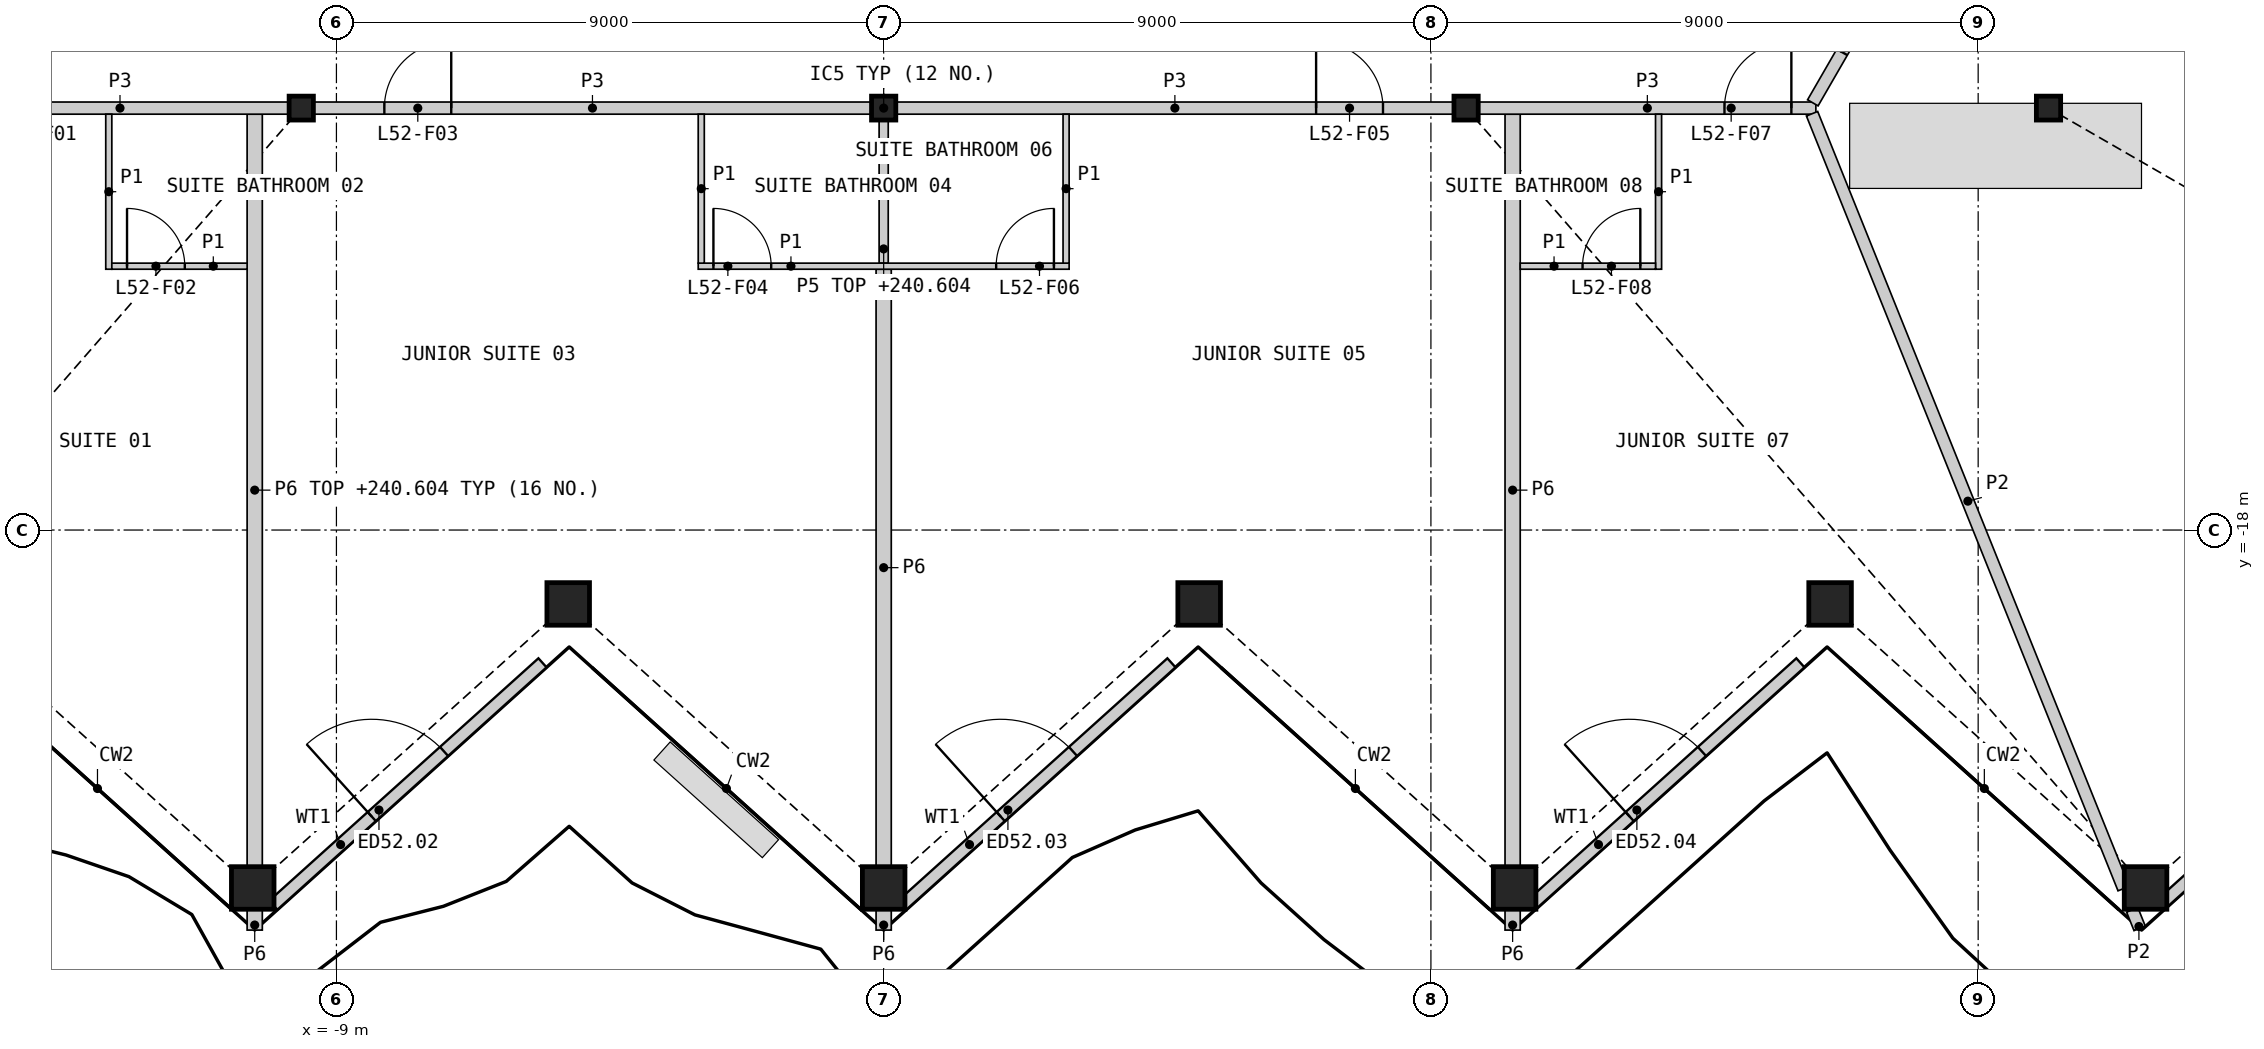
"""IFC4 building model, lengths in metres.
Left out: names, types, materials, properties, quantities, classifications, styles, units other than length and angle.
Written with IfcOpenShell. Run it as: python <this file> out.ifc"""

import sys

from ifc_helpers import new_model, si_unit, direction, frame, frame_2d, origin, origin_2d, place, context, subcontext, project, spatial, rectangle, hollow_rectangle, i_section, extrude, element, fill, save


model = new_model("IFC4")
c1 = context("Model", 3, precision=1e-05, world=origin(), true_north=direction((0.0, 1.0)))
c2 = subcontext(c1, "Body", "Model", "MODEL_VIEW")
j1 = project(units=[si_unit("LENGTHUNIT", "METRE"), si_unit("PLANEANGLEUNIT", "RADIAN")], contexts=[c1])
p1 = place(None, origin())
s1 = spatial("IfcSite", under=j1, at=p1, CompositionType="ELEMENT")
p2 = place(p1, origin())
s2 = spatial("IfcBuilding", under=s1, at=p2, CompositionType="ELEMENT")
p3 = place(p2, frame((0.0, 0.0, 238.2)))
s3 = spatial("IfcBuildingStorey", under=s2, at=p3, CompositionType="ELEMENT", Elevation=238.2)
for number, where, z_axis, x_axis in (
    (1, (-10.376, -23.887, 0.0), (0.0, 0.0, 1.0), (1.0, 0.0, 0.0)),
    (2, (-5.188, -19.215, 0.0), (0.0, 0.0, 1.0), (1.0, 0.0, 0.0)),
    (3, (0.0, -23.887, 0.0), (0.0, 0.0, 1.0), (1.0, 0.0, 0.0)),
    (4, (5.188, -19.215, 0.0), (0.0, 0.0, 1.0), (1.0, 0.0, 0.0)),
    (5, (10.376, -23.887, 0.0), (0.0, 0.0, 1.0), (1.0, 0.0, 0.0)),
    (6, (15.565, -19.215, 0.0), (0.0, 0.0, 1.0), (1.0, 0.0, 0.0)),
    (7, (20.753, -23.887, 0.0), (0.0, 0.0, 1.0), (1.0, 0.0, 0.0)),
):
    element("IfcColumn", number, at=place(p3, frame(where, z_axis=z_axis, x_axis=x_axis)), inside=s3, PredefinedType="COLUMN", context=c2, shape_type="SweptSolid", body=[
        extrude(hollow_rectangle(XDim=0.7, YDim=0.7, WallThickness=0.045, at=origin_2d()), origin(), (0.0, 0.0, 1.0), 3.6),
    ])
for number, where, z_axis, x_axis in (
    (8, (-9.578, -11.06, 0.0), (0.0, 0.0, 1.0), (1.0, 0.0, 0.0)),
    (9, (0.0, -11.06, 0.0), (0.0, 0.0, 1.0), (1.0, 0.0, 0.0)),
    (10, (9.578, -11.06, 0.0), (0.0, 0.0, 1.0), (1.0, 0.0, 0.0)),
    (11, (19.157, -11.06, 0.0), (0.0, 0.0, 1.0), (1.0, 0.0, 0.0)),
):
    element("IfcColumn", number, at=place(p3, frame(where, z_axis=z_axis, x_axis=x_axis)), inside=s3, PredefinedType="COLUMN", context=c2, shape_type="SweptSolid", body=[
        extrude(i_section(OverallWidth=0.399, OverallDepth=0.393, WebThickness=0.023, FlangeThickness=0.037, at=origin_2d()), origin(), (0.0, 0.0, 1.0), 3.6),
    ])
p4 = place(p3, frame((-10.038, -24.17, 0.0), z_axis=(0.0, 0.0, 1.0), x_axis=(0.743143336638, 0.669132259878, 0.0)))
e12 = element("IfcWall", 12, at=p4, inside=s3, PredefinedType="SOLIDWALL", context=c2, shape_type="SweptSolid", body=[
    extrude(rectangle(XDim=5.958, YDim=0.2, at=frame_2d((2.979, 0.0))), origin(), (0.0, 0.0, 1.0), 2.701),
])
p5 = place(p4, frame((2.179, 0.0, 0.0)))
e13 = element("IfcOpeningElement", 13, at=p5, cuts=e12, PredefinedType="OPENING", context=c2, shape_type="SweptSolid", body=[
    extrude(rectangle(XDim=1.6, YDim=2.4, at=frame_2d((0.8, 1.2))), frame((0.0, 0.11, 0.0), z_axis=(0.0, -1.0, 0.0), x_axis=(1.0, 0.0, 0.0)), (0.0, 0.0, 1.0), 0.22),
])
p6 = place(p3, frame((0.305, -24.17, 0.0), z_axis=(0.0, 0.0, 1.0), x_axis=(0.743143336638, 0.669132259878, 0.0)))
e14 = element("IfcWall", 14, at=p6, inside=s3, PredefinedType="SOLIDWALL", context=c2, shape_type="SweptSolid", body=[
    extrude(rectangle(XDim=5.958, YDim=0.2, at=frame_2d((2.979, 0.0))), origin(), (0.0, 0.0, 1.0), 2.701),
])
p7 = place(p6, frame((2.179, 0.0, 0.0)))
e15 = element("IfcOpeningElement", 15, at=p7, cuts=e14, PredefinedType="OPENING", context=c2, shape_type="SweptSolid", body=[
    extrude(rectangle(XDim=1.6, YDim=2.4, at=frame_2d((0.8, 1.2))), frame((0.0, 0.11, 0.0), z_axis=(0.0, -1.0, 0.0), x_axis=(1.0, 0.0, 0.0)), (0.0, 0.0, 1.0), 0.22),
])
p8 = place(p3, frame((10.649, -24.17, 0.0), z_axis=(0.0, 0.0, 1.0), x_axis=(0.743143336638, 0.669132259878, 0.0)))
e16 = element("IfcWall", 16, at=p8, inside=s3, PredefinedType="SOLIDWALL", context=c2, shape_type="SweptSolid", body=[
    extrude(rectangle(XDim=5.958, YDim=0.2, at=frame_2d((2.979, 0.0))), origin(), (0.0, 0.0, 1.0), 2.701),
])
p9 = place(p8, frame((2.179, 0.0, 0.0)))
e17 = element("IfcOpeningElement", 17, at=p9, cuts=e16, PredefinedType="OPENING", context=c2, shape_type="SweptSolid", body=[
    extrude(rectangle(XDim=1.6, YDim=2.4, at=frame_2d((0.8, 1.2))), frame((0.0, 0.11, 0.0), z_axis=(0.0, -1.0, 0.0), x_axis=(1.0, 0.0, 0.0)), (0.0, 0.0, 1.0), 0.22),
])
p10 = place(p3, frame((20.993, -24.17, 0.0), z_axis=(0.0, 0.0, 1.0), x_axis=(0.743143336638, 0.669132259878, 0.0)))
e18 = element("IfcWall", 18, at=p10, inside=s3, PredefinedType="SOLIDWALL", context=c2, shape_type="SweptSolid", body=[
    extrude(rectangle(XDim=5.958, YDim=0.2, at=frame_2d((2.979, 0.0))), origin(), (0.0, 0.0, 1.0), 2.701),
])
p11 = place(p10, frame((2.179, 0.0, 0.0)))
e19 = element("IfcOpeningElement", 19, at=p11, cuts=e18, PredefinedType="OPENING", context=c2, shape_type="SweptSolid", body=[
    extrude(rectangle(XDim=1.6, YDim=2.4, at=frame_2d((0.8, 1.2))), frame((0.0, 0.11, 0.0), z_axis=(0.0, -1.0, 0.0), x_axis=(1.0, 0.0, 0.0)), (0.0, 0.0, 1.0), 0.22),
])
for number, where, z_axis, x_axis in (
    (20, (-10.344, -23.527, 0.0), (0.0, 0.0, 1.0), (0.0, 1.0, 0.0)),
    (21, (10.344, -23.527, 0.0), (0.0, 0.0, 1.0), (0.0, 1.0, 0.0)),
):
    element("IfcWall", number, at=place(p3, frame(where, z_axis=z_axis, x_axis=x_axis)), inside=s3, PredefinedType="PARTITIONING", context=c2, shape_type="SweptSolid", body=[
        extrude(rectangle(XDim=12.366, YDim=0.25, at=frame_2d((6.183, 0.0))), origin(), (0.0, 0.0, 1.0), 2.404),
    ])
p12 = place(p3, frame((0.0, -23.527, 0.0), z_axis=(0.0, 0.0, 1.0), x_axis=(0.0, 1.0, 0.0)))
e22 = element("IfcWall", 22, at=p12, inside=s3, PredefinedType="PARTITIONING", context=c2, shape_type="SweptSolid", body=[
    extrude(rectangle(XDim=9.817, YDim=0.25, at=frame_2d((4.908, 0.0))), origin(), (0.0, 0.0, 1.0), 2.404),
])
p13 = place(p3, frame((-9.369, -11.06, 0.0), z_axis=(0.0, 0.0, 1.0), x_axis=(1.0, 0.0, 0.0)))
e23 = element("IfcWall", 23, at=p13, inside=s3, PredefinedType="PARTITIONING", context=c2, shape_type="SweptSolid", body=[
    extrude(rectangle(XDim=9.159, YDim=0.2, at=frame_2d((4.58, 0.0))), origin(), (0.0, 0.0, 1.0), 3.25),
])
p14 = place(p13, frame((1.157, 0.0, 0.0)))
e24 = element("IfcOpeningElement", 24, at=p14, cuts=e23, PredefinedType="OPENING", context=c2, shape_type="SweptSolid", body=[
    extrude(rectangle(XDim=1.1, YDim=2.1, at=frame_2d((0.55, 1.05))), frame((0.0, 0.11, 0.0), z_axis=(0.0, -1.0, 0.0), x_axis=(1.0, 0.0, 0.0)), (0.0, 0.0, 1.0), 0.22),
])
p15 = place(p3, frame((0.209, -11.06, 0.0), z_axis=(0.0, 0.0, 1.0), x_axis=(1.0, 0.0, 0.0)))
e25 = element("IfcWall", 25, at=p15, inside=s3, PredefinedType="PARTITIONING", context=c2, shape_type="SweptSolid", body=[
    extrude(rectangle(XDim=9.159, YDim=0.2, at=frame_2d((4.58, 0.0))), origin(), (0.0, 0.0, 1.0), 3.25),
])
p16 = place(p15, frame((6.902, 0.0, 0.0)))
e26 = element("IfcOpeningElement", 26, at=p16, cuts=e25, PredefinedType="OPENING", context=c2, shape_type="SweptSolid", body=[
    extrude(rectangle(XDim=1.1, YDim=2.1, at=frame_2d((0.55, 1.05))), frame((0.0, 0.11, 0.0), z_axis=(0.0, -1.0, 0.0), x_axis=(1.0, 0.0, 0.0)), (0.0, 0.0, 1.0), 0.22),
])
p17 = place(p3, frame((-15.331, -11.06, 0.0), z_axis=(0.0, 0.0, 1.0), x_axis=(1.0, 0.0, 0.0)))
e27 = element("IfcWall", 27, at=p17, inside=s3, PredefinedType="PARTITIONING", context=c2, shape_type="SweptSolid", body=[
    extrude(rectangle(XDim=5.543, YDim=0.2, at=frame_2d((2.771, 0.0))), origin(), (0.0, 0.0, 1.0), 3.25),
])
p18 = place(p17, frame((0.403, 0.0, 0.0)))
e28 = element("IfcOpeningElement", 28, at=p18, cuts=e27, PredefinedType="OPENING", context=c2, shape_type="SweptSolid", body=[
    extrude(rectangle(XDim=1.1, YDim=2.1, at=frame_2d((0.55, 1.05))), frame((0.0, 0.11, 0.0), z_axis=(0.0, -1.0, 0.0), x_axis=(1.0, 0.0, 0.0)), (0.0, 0.0, 1.0), 0.22),
])
p19 = place(p3, frame((9.788, -11.06, 0.0), z_axis=(0.0, 0.0, 1.0), x_axis=(1.0, 0.0, 0.0)))
e29 = element("IfcWall", 29, at=p19, inside=s3, PredefinedType="PARTITIONING", context=c2, shape_type="SweptSolid", body=[
    extrude(rectangle(XDim=5.543, YDim=0.2, at=frame_2d((2.771, 0.0))), origin(), (0.0, 0.0, 1.0), 3.25),
])
p20 = place(p19, frame((4.04, 0.0, 0.0)))
e30 = element("IfcOpeningElement", 30, at=p20, cuts=e29, PredefinedType="OPENING", context=c2, shape_type="SweptSolid", body=[
    extrude(rectangle(XDim=1.1, YDim=2.1, at=frame_2d((0.55, 1.05))), frame((0.0, 0.11, 0.0), z_axis=(0.0, -1.0, 0.0), x_axis=(1.0, 0.0, 0.0)), (0.0, 0.0, 1.0), 0.22),
])
p21 = place(p3, frame((15.281, -10.974, 0.0), z_axis=(0.0, 0.0, 1.0), x_axis=(0.499958791762, 0.866049194065, 0.0)))
e31 = element("IfcWall", 31, at=p21, inside=s3, PredefinedType="PARTITIONING", context=c2, shape_type="SweptSolid", body=[
    extrude(rectangle(XDim=3.726, YDim=0.2, at=frame_2d((1.863, 0.0))), origin(), (0.0, 0.0, 1.0), 3.25),
])
p22 = place(p21, frame((0.963, 0.0, 0.0)))
e32 = element("IfcOpeningElement", 32, at=p22, cuts=e31, PredefinedType="OPENING", context=c2, shape_type="SweptSolid", body=[
    extrude(rectangle(XDim=1.8, YDim=2.1, at=frame_2d((0.9, 1.05))), frame((0.0, 0.11, 0.0), z_axis=(0.0, -1.0, 0.0), x_axis=(1.0, 0.0, 0.0)), (0.0, 0.0, 1.0), 0.22),
])
for number, where, z_axis, x_axis in (
    (33, (-10.344, -24.58, 0.0), (0.0, 0.0, 1.0), (0.0, 1.0, 0.0)),
    (34, (0.0, -24.58, 0.0), (0.0, 0.0, 1.0), (0.0, 1.0, 0.0)),
    (35, (10.344, -24.58, 0.0), (0.0, 0.0, 1.0), (0.0, 1.0, 0.0)),
):
    element("IfcWall", number, at=place(p3, frame(where, z_axis=z_axis, x_axis=x_axis)), inside=s3, PredefinedType="PARTITIONING", context=c2, shape_type="SweptSolid", body=[
        extrude(rectangle(XDim=0.333, YDim=0.25, at=frame_2d((0.167, 0.0))), origin(), (0.0, 0.0, 1.0), 2.404),
    ])
p23 = place(p3, frame((15.268, -11.153, 0.0), z_axis=(0.0, 0.0, 1.0), x_axis=(0.373096979113, -0.927792349708, 0.0)))
e36 = element("IfcWall", 36, at=p23, inside=s3, PredefinedType="PARTITIONING", context=c2, shape_type="SweptSolid", body=[
    extrude(rectangle(XDim=13.736, YDim=0.2, at=frame_2d((6.868, 0.0))), origin(), (0.0, 0.0, 1.0), 2.404),
])
p24 = place(p3, frame((20.534, -24.247, 0.0), z_axis=(0.0, 0.0, 1.0), x_axis=(0.372801499492, -0.927911117498, 0.0)))
e37 = element("IfcWall", 37, at=p24, inside=s3, PredefinedType="PARTITIONING", context=c2, shape_type="SweptSolid", body=[
    extrude(rectangle(XDim=0.328, YDim=0.2, at=frame_2d((0.164, 0.0))), origin(), (0.0, 0.0, 1.0), 2.404),
])
p25 = place(p3, frame((0.0, -13.61, 0.0), z_axis=(0.0, 0.0, 1.0), x_axis=(0.0, 1.0, 0.0)))
e38 = element("IfcWall", 38, at=p25, inside=s3, PredefinedType="PLUMBINGWALL", context=c2, shape_type="SweptSolid", body=[
    extrude(rectangle(XDim=2.341, YDim=0.15, at=frame_2d((1.17, 0.0))), origin(), (0.0, 0.0, 1.0), 2.404),
])
p26 = place(p3, frame((-3.05, -13.66, 0.0), z_axis=(0.0, 0.0, 1.0), x_axis=(1.0, 0.0, 0.0)))
e39 = element("IfcWall", 39, at=p26, inside=s3, PredefinedType="PARTITIONING", context=c2, shape_type="SweptSolid", body=[
    extrude(rectangle(XDim=6.1, YDim=0.1, at=frame_2d((3.05, 0.0))), origin(), (0.0, 0.0, 1.0), 2.404),
])
p27 = place(p26, frame((0.25, 0.0, 0.0)))
e40 = element("IfcOpeningElement", 40, at=p27, cuts=e39, PredefinedType="OPENING", context=c2, shape_type="SweptSolid", body=[
    extrude(rectangle(XDim=0.95, YDim=2.1, at=frame_2d((0.475, 1.05))), frame((0.0, 0.06, 0.0), z_axis=(0.0, -1.0, 0.0), x_axis=(1.0, 0.0, 0.0)), (0.0, 0.0, 1.0), 0.12),
])
p28 = place(p26, frame((4.9, 0.0, 0.0)))
e41 = element("IfcOpeningElement", 41, at=p28, cuts=e39, PredefinedType="OPENING", context=c2, shape_type="SweptSolid", body=[
    extrude(rectangle(XDim=0.95, YDim=2.1, at=frame_2d((0.475, 1.05))), frame((0.0, 0.06, 0.0), z_axis=(0.0, -1.0, 0.0), x_axis=(1.0, 0.0, 0.0)), (0.0, 0.0, 1.0), 0.12),
])
p29 = place(p3, frame((-12.744, -13.71, 0.0), z_axis=(0.0, 0.0, 1.0), x_axis=(0.0, 1.0, 0.0)))
e42 = element("IfcWall", 42, at=p29, inside=s3, PredefinedType="PARTITIONING", context=c2, shape_type="SweptSolid", body=[
    extrude(rectangle(XDim=2.55, YDim=0.1, at=frame_2d((1.275, 0.0))), origin(), (0.0, 0.0, 1.0), 2.404),
])
for number, where, z_axis, x_axis in (
    (43, (-3.0, -13.61, 0.0), (0.0, 0.0, 1.0), (0.0, 1.0, 0.0)),
    (44, (3.0, -13.61, 0.0), (0.0, 0.0, 1.0), (0.0, 1.0, 0.0)),
):
    element("IfcWall", number, at=place(p3, frame(where, z_axis=z_axis, x_axis=x_axis)), inside=s3, PredefinedType="PARTITIONING", context=c2, shape_type="SweptSolid", body=[
        extrude(rectangle(XDim=2.45, YDim=0.1, at=frame_2d((1.225, 0.0))), origin(), (0.0, 0.0, 1.0), 2.404),
    ])
p30 = place(p3, frame((12.744, -13.71, 0.0), z_axis=(0.0, 0.0, 1.0), x_axis=(0.0, 1.0, 0.0)))
e45 = element("IfcWall", 45, at=p30, inside=s3, PredefinedType="PARTITIONING", context=c2, shape_type="SweptSolid", body=[
    extrude(rectangle(XDim=2.55, YDim=0.1, at=frame_2d((1.275, 0.0))), origin(), (0.0, 0.0, 1.0), 2.404),
])
p31 = place(p3, frame((-12.694, -13.66, 0.0), z_axis=(0.0, 0.0, 1.0), x_axis=(1.0, 0.0, 0.0)))
e46 = element("IfcWall", 46, at=p31, inside=s3, PredefinedType="PARTITIONING", context=c2, shape_type="SweptSolid", body=[
    extrude(rectangle(XDim=2.225, YDim=0.1, at=frame_2d((1.113, 0.0))), origin(), (0.0, 0.0, 1.0), 2.404),
])
p32 = place(p31, frame((0.25, 0.0, 0.0)))
e47 = element("IfcOpeningElement", 47, at=p32, cuts=e46, PredefinedType="OPENING", context=c2, shape_type="SweptSolid", body=[
    extrude(rectangle(XDim=0.95, YDim=2.1, at=frame_2d((0.475, 1.05))), frame((0.0, 0.06, 0.0), z_axis=(0.0, -1.0, 0.0), x_axis=(1.0, 0.0, 0.0)), (0.0, 0.0, 1.0), 0.12),
])
p33 = place(p3, frame((10.469, -13.66, 0.0), z_axis=(0.0, 0.0, 1.0), x_axis=(1.0, 0.0, 0.0)))
e48 = element("IfcWall", 48, at=p33, inside=s3, PredefinedType="PARTITIONING", context=c2, shape_type="SweptSolid", body=[
    extrude(rectangle(XDim=2.225, YDim=0.1, at=frame_2d((1.113, 0.0))), origin(), (0.0, 0.0, 1.0), 2.404),
])
p34 = place(p33, frame((1.025, 0.0, 0.0)))
e49 = element("IfcOpeningElement", 49, at=p34, cuts=e48, PredefinedType="OPENING", context=c2, shape_type="SweptSolid", body=[
    extrude(rectangle(XDim=0.95, YDim=2.1, at=frame_2d((0.475, 1.05))), frame((0.0, 0.06, 0.0), z_axis=(0.0, -1.0, 0.0), x_axis=(1.0, 0.0, 0.0)), (0.0, 0.0, 1.0), 0.12),
])
p35 = place(p5, origin())
e50 = element("IfcDoor", 50, at=p35, inside=s3, OperationType="DOUBLE_DOOR_SINGLE_SWING", PredefinedType="DOOR", context=c2, shape_type="SweptSolid", body=[
    extrude(rectangle(XDim=1.6, YDim=2.4, at=frame_2d((0.8, 1.2))), frame((0.0, 0.025, 0.0), z_axis=(0.0, -1.0, 0.0), x_axis=(1.0, 0.0, 0.0)), (0.0, 0.0, 1.0), 0.05),
])
fill(e13, e50)
p36 = place(p7, origin())
e51 = element("IfcDoor", 51, at=p36, inside=s3, OperationType="DOUBLE_DOOR_SINGLE_SWING", PredefinedType="DOOR", context=c2, shape_type="SweptSolid", body=[
    extrude(rectangle(XDim=1.6, YDim=2.4, at=frame_2d((0.8, 1.2))), frame((0.0, 0.025, 0.0), z_axis=(0.0, -1.0, 0.0), x_axis=(1.0, 0.0, 0.0)), (0.0, 0.0, 1.0), 0.05),
])
fill(e15, e51)
p37 = place(p9, origin())
e52 = element("IfcDoor", 52, at=p37, inside=s3, OperationType="DOUBLE_DOOR_SINGLE_SWING", PredefinedType="DOOR", context=c2, shape_type="SweptSolid", body=[
    extrude(rectangle(XDim=1.6, YDim=2.4, at=frame_2d((0.8, 1.2))), frame((0.0, 0.025, 0.0), z_axis=(0.0, -1.0, 0.0), x_axis=(1.0, 0.0, 0.0)), (0.0, 0.0, 1.0), 0.05),
])
fill(e17, e52)
p38 = place(p32, origin())
e53 = element("IfcDoor", 53, at=p38, inside=s3, OperationType="SINGLE_SWING_LEFT", PredefinedType="DOOR", context=c2, shape_type="SweptSolid", body=[
    extrude(rectangle(XDim=0.95, YDim=2.1, at=frame_2d((0.475, 1.05))), frame((0.0, 0.025, 0.0), z_axis=(0.0, -1.0, 0.0), x_axis=(1.0, 0.0, 0.0)), (0.0, 0.0, 1.0), 0.05),
])
fill(e47, e53)
p39 = place(p14, origin())
e54 = element("IfcDoor", 54, at=p39, inside=s3, OperationType="SINGLE_SWING_RIGHT", PredefinedType="DOOR", context=c2, shape_type="SweptSolid", body=[
    extrude(rectangle(XDim=1.1, YDim=2.1, at=frame_2d((0.55, 1.05))), frame((0.0, 0.025, 0.0), z_axis=(0.0, -1.0, 0.0), x_axis=(1.0, 0.0, 0.0)), (0.0, 0.0, 1.0), 0.05),
])
fill(e24, e54)
p40 = place(p27, origin())
e55 = element("IfcDoor", 55, at=p40, inside=s3, OperationType="SINGLE_SWING_LEFT", PredefinedType="DOOR", context=c2, shape_type="SweptSolid", body=[
    extrude(rectangle(XDim=0.95, YDim=2.1, at=frame_2d((0.475, 1.05))), frame((0.0, 0.025, 0.0), z_axis=(0.0, -1.0, 0.0), x_axis=(1.0, 0.0, 0.0)), (0.0, 0.0, 1.0), 0.05),
])
fill(e40, e55)
p41 = place(p16, origin())
e56 = element("IfcDoor", 56, at=p41, inside=s3, OperationType="SINGLE_SWING_LEFT", PredefinedType="DOOR", context=c2, shape_type="SweptSolid", body=[
    extrude(rectangle(XDim=1.1, YDim=2.1, at=frame_2d((0.55, 1.05))), frame((0.0, 0.025, 0.0), z_axis=(0.0, -1.0, 0.0), x_axis=(1.0, 0.0, 0.0)), (0.0, 0.0, 1.0), 0.05),
])
fill(e26, e56)
p42 = place(p28, origin())
e57 = element("IfcDoor", 57, at=p42, inside=s3, OperationType="SINGLE_SWING_RIGHT", PredefinedType="DOOR", context=c2, shape_type="SweptSolid", body=[
    extrude(rectangle(XDim=0.95, YDim=2.1, at=frame_2d((0.475, 1.05))), frame((0.0, 0.025, 0.0), z_axis=(0.0, -1.0, 0.0), x_axis=(1.0, 0.0, 0.0)), (0.0, 0.0, 1.0), 0.05),
])
fill(e41, e57)
p43 = place(p20, origin())
e58 = element("IfcDoor", 58, at=p43, inside=s3, OperationType="SINGLE_SWING_RIGHT", PredefinedType="DOOR", context=c2, shape_type="SweptSolid", body=[
    extrude(rectangle(XDim=1.1, YDim=2.1, at=frame_2d((0.55, 1.05))), frame((0.0, 0.025, 0.0), z_axis=(0.0, -1.0, 0.0), x_axis=(1.0, 0.0, 0.0)), (0.0, 0.0, 1.0), 0.05),
])
fill(e30, e58)
p44 = place(p34, origin())
e59 = element("IfcDoor", 59, at=p44, inside=s3, OperationType="SINGLE_SWING_RIGHT", PredefinedType="DOOR", context=c2, shape_type="SweptSolid", body=[
    extrude(rectangle(XDim=0.95, YDim=2.1, at=frame_2d((0.475, 1.05))), frame((0.0, 0.025, 0.0), z_axis=(0.0, -1.0, 0.0), x_axis=(1.0, 0.0, 0.0)), (0.0, 0.0, 1.0), 0.05),
])
fill(e49, e59)
p45 = place(p22, origin())
e60 = element("IfcDoor", 60, at=p45, inside=s3, OperationType="DOUBLE_DOOR_SINGLE_SWING", PredefinedType="DOOR", context=c2, shape_type="SweptSolid", body=[
    extrude(rectangle(XDim=1.8, YDim=2.1, at=frame_2d((0.9, 1.05))), frame((0.0, 0.025, 0.0), z_axis=(0.0, -1.0, 0.0), x_axis=(1.0, 0.0, 0.0)), (0.0, 0.0, 1.0), 0.05),
])
fill(e32, e60)
save(model, sys.argv[1])
